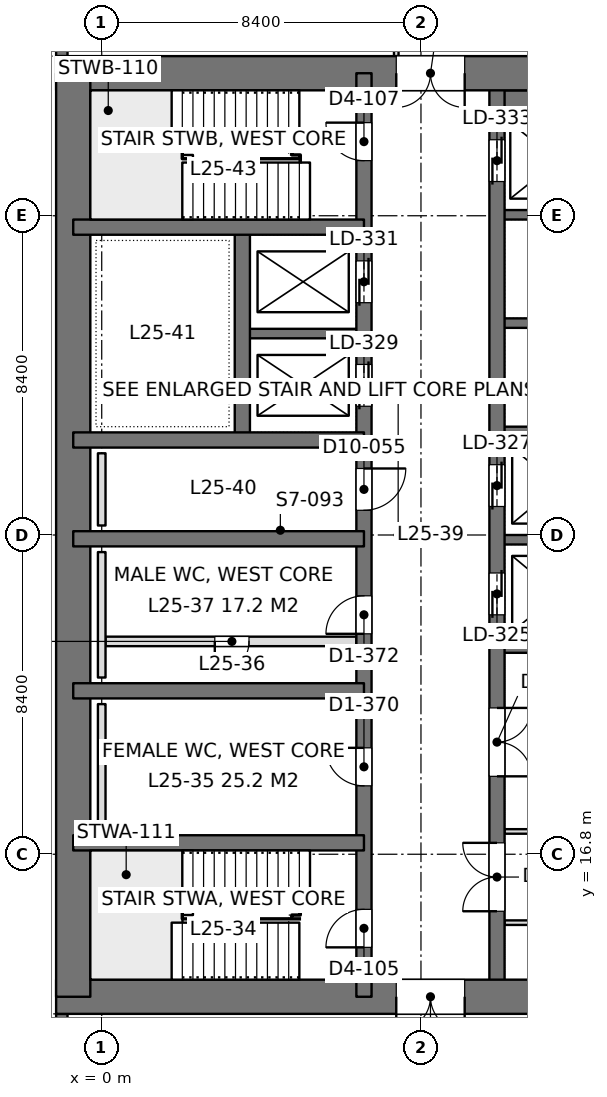
"""IFC4 building model, lengths in metres.
Left out: names, types, materials, properties, quantities, classifications, styles, units other than length and angle.
Written with IfcOpenShell. Run it as: python <this file> out.ifc"""

import sys

from ifc_helpers import new_model, si_unit, direction, frame, frame_2d, origin, place, context, subcontext, project, spatial, rectangle, extrude, element, fill, save


model = new_model("IFC4")
c1 = context("Model", 3, precision=1e-05, world=origin(), true_north=direction((0.0, 1.0)))
c2 = subcontext(c1, "Body", "Model", "MODEL_VIEW")
j1 = project(units=[si_unit("LENGTHUNIT", "METRE"), si_unit("PLANEANGLEUNIT", "RADIAN")], contexts=[c1])
p1 = place(None, origin())
s1 = spatial("IfcSite", under=j1, at=p1, CompositionType="ELEMENT")
p2 = place(p1, origin())
s2 = spatial("IfcBuilding", under=s1, at=p2, CompositionType="ELEMENT")
p3 = place(p2, frame((0.0, 0.0, 113.4)))
s3 = spatial("IfcBuildingStorey", under=s2, at=p3, CompositionType="ELEMENT", Elevation=113.4)
p4 = place(p3, frame((-1.2, 13.05, 0.0), z_axis=(0.0, 0.0, 1.0), x_axis=(1.0, 0.0, 0.0)))
e1 = element("IfcWall", 1, at=p4, inside=s3, PredefinedType="SHEAR", context=c2, shape_type="SweptSolid", body=[
    extrude(rectangle(XDim=18.0, YDim=0.9, at=frame_2d((9.0, 0.0))), origin(), (0.0, 0.0, 1.0), 4.2),
])
p5 = place(p4, frame((8.95, 0.0, 0.0)))
e2 = element("IfcOpeningElement", 2, at=p5, cuts=e1, PredefinedType="OPENING", context=c2, shape_type="SweptSolid", body=[
    extrude(rectangle(XDim=1.8, YDim=2.4, at=frame_2d((0.9, 1.2))), frame((0.0, 0.46, 0.0), z_axis=(0.0, -1.0, 0.0), x_axis=(1.0, 0.0, 0.0)), (0.0, 0.0, 1.0), 0.92),
])
p6 = place(p3, frame((-1.2, 37.35, 0.0), z_axis=(0.0, 0.0, 1.0), x_axis=(1.0, 0.0, 0.0)))
e3 = element("IfcWall", 3, at=p6, inside=s3, PredefinedType="SHEAR", context=c2, shape_type="SweptSolid", body=[
    extrude(rectangle(XDim=18.0, YDim=0.9, at=frame_2d((9.0, 0.0))), origin(), (0.0, 0.0, 1.0), 4.2),
])
p7 = place(p6, frame((8.95, 0.0, 0.0)))
e4 = element("IfcOpeningElement", 4, at=p7, cuts=e3, PredefinedType="OPENING", context=c2, shape_type="SweptSolid", body=[
    extrude(rectangle(XDim=1.8, YDim=2.4, at=frame_2d((0.9, 1.2))), frame((0.0, 0.46, 0.0), z_axis=(0.0, -1.0, 0.0), x_axis=(1.0, 0.0, 0.0)), (0.0, 0.0, 1.0), 0.92),
])
p8 = place(p3, frame((-0.75, 13.05, 0.0), z_axis=(0.0, 0.0, 1.0), x_axis=(0.0, 1.0, 0.0)))
e5 = element("IfcWall", 5, at=p8, inside=s3, PredefinedType="SHEAR", context=c2, shape_type="SweptSolid", body=[
    extrude(rectangle(XDim=24.3, YDim=0.9, at=frame_2d((12.15, 0.0))), origin(), (0.0, 0.0, 1.0), 4.2),
])
p9 = place(p3, frame((6.9, 13.05, 0.0), z_axis=(0.0, 0.0, 1.0), x_axis=(0.0, 1.0, 0.0)))
e6 = element("IfcWall", 6, at=p9, inside=s3, PredefinedType="SHEAR", context=c2, shape_type="SweptSolid", body=[
    extrude(rectangle(XDim=24.3, YDim=0.4, at=frame_2d((12.15, 0.0))), origin(), (0.0, 0.0, 1.0), 4.2),
])
p10 = place(p9, frame((1.3, 0.0, 0.0)))
e7 = element("IfcOpeningElement", 7, at=p10, cuts=e6, PredefinedType="OPENING", context=c2, shape_type="SweptSolid", body=[
    extrude(rectangle(XDim=1.0, YDim=2.2, at=frame_2d((0.5, 1.1))), frame((0.0, 0.21, 0.0), z_axis=(0.0, -1.0, 0.0), x_axis=(1.0, 0.0, 0.0)), (0.0, 0.0, 1.0), 0.42),
])
p11 = place(p9, frame((22.0, 0.0, 0.0)))
e8 = element("IfcOpeningElement", 8, at=p11, cuts=e6, PredefinedType="OPENING", context=c2, shape_type="SweptSolid", body=[
    extrude(rectangle(XDim=1.0, YDim=2.2, at=frame_2d((0.5, 1.1))), frame((0.0, 0.21, 0.0), z_axis=(0.0, -1.0, 0.0), x_axis=(1.0, 0.0, 0.0)), (0.0, 0.0, 1.0), 0.42),
])
p12 = place(p9, frame((5.55, 0.0, 0.0)))
e9 = element("IfcOpeningElement", 9, at=p12, cuts=e6, PredefinedType="OPENING", context=c2, shape_type="SweptSolid", body=[
    extrude(rectangle(XDim=1.0, YDim=2.2, at=frame_2d((0.5, 1.1))), frame((0.0, 0.21, 0.0), z_axis=(0.0, -1.0, 0.0), x_axis=(1.0, 0.0, 0.0)), (0.0, 0.0, 1.0), 0.42),
])
p13 = place(p9, frame((9.55, 0.0, 0.0)))
e10 = element("IfcOpeningElement", 10, at=p13, cuts=e6, PredefinedType="OPENING", context=c2, shape_type="SweptSolid", body=[
    extrude(rectangle(XDim=1.0, YDim=2.2, at=frame_2d((0.5, 1.1))), frame((0.0, 0.21, 0.0), z_axis=(0.0, -1.0, 0.0), x_axis=(1.0, 0.0, 0.0)), (0.0, 0.0, 1.0), 0.42),
])
p14 = place(p9, frame((12.8, 0.0, 0.0)))
e11 = element("IfcOpeningElement", 11, at=p14, cuts=e6, PredefinedType="OPENING", context=c2, shape_type="SweptSolid", body=[
    extrude(rectangle(XDim=1.1, YDim=2.2, at=frame_2d((0.55, 1.1))), frame((0.0, 0.21, 0.0), z_axis=(0.0, -1.0, 0.0), x_axis=(1.0, 0.0, 0.0)), (0.0, 0.0, 1.0), 0.42),
])
p15 = place(p9, frame((15.538, 0.0, 0.0)))
e12 = element("IfcOpeningElement", 12, at=p15, cuts=e6, PredefinedType="OPENING", context=c2, shape_type="SweptSolid", body=[
    extrude(rectangle(XDim=1.1, YDim=2.2, at=frame_2d((0.55, 1.1))), frame((0.0, 0.21, 0.0), z_axis=(0.0, -1.0, 0.0), x_axis=(1.0, 0.0, 0.0)), (0.0, 0.0, 1.0), 0.42),
])
p16 = place(p9, frame((18.262, 0.0, 0.0)))
e13 = element("IfcOpeningElement", 13, at=p16, cuts=e6, PredefinedType="OPENING", context=c2, shape_type="SweptSolid", body=[
    extrude(rectangle(XDim=1.1, YDim=2.2, at=frame_2d((0.55, 1.1))), frame((0.0, 0.21, 0.0), z_axis=(0.0, -1.0, 0.0), x_axis=(1.0, 0.0, 0.0)), (0.0, 0.0, 1.0), 0.42),
])
p17 = place(p3, frame((10.4, 13.05, 0.0), z_axis=(0.0, 0.0, 1.0), x_axis=(0.0, 1.0, 0.0)))
e14 = element("IfcWall", 14, at=p17, inside=s3, PredefinedType="SHEAR", context=c2, shape_type="SweptSolid", body=[
    extrude(rectangle(XDim=24.3, YDim=0.4, at=frame_2d((12.15, 0.0))), origin(), (0.0, 0.0, 1.0), 4.2),
])
p18 = place(p17, frame((10.05, 0.0, 0.0)))
e15 = element("IfcOpeningElement", 15, at=p18, cuts=e14, PredefinedType="OPENING", context=c2, shape_type="SweptSolid", body=[
    extrude(rectangle(XDim=1.1, YDim=2.2, at=frame_2d((0.55, 1.1))), frame((0.0, 0.21, 0.0), z_axis=(0.0, -1.0, 0.0), x_axis=(1.0, 0.0, 0.0)), (0.0, 0.0, 1.0), 0.42),
])
p19 = place(p17, frame((12.9, 0.0, 0.0)))
e16 = element("IfcOpeningElement", 16, at=p19, cuts=e14, PredefinedType="OPENING", context=c2, shape_type="SweptSolid", body=[
    extrude(rectangle(XDim=1.1, YDim=2.2, at=frame_2d((0.55, 1.1))), frame((0.0, 0.21, 0.0), z_axis=(0.0, -1.0, 0.0), x_axis=(1.0, 0.0, 0.0)), (0.0, 0.0, 1.0), 0.42),
])
p20 = place(p17, frame((21.45, 0.0, 0.0)))
e17 = element("IfcOpeningElement", 17, at=p20, cuts=e14, PredefinedType="OPENING", context=c2, shape_type="SweptSolid", body=[
    extrude(rectangle(XDim=1.1, YDim=2.2, at=frame_2d((0.55, 1.1))), frame((0.0, 0.21, 0.0), z_axis=(0.0, -1.0, 0.0), x_axis=(1.0, 0.0, 0.0)), (0.0, 0.0, 1.0), 0.42),
])
p21 = place(p17, frame((2.25, 0.0, 0.0)))
e18 = element("IfcOpeningElement", 18, at=p21, cuts=e14, PredefinedType="OPENING", context=c2, shape_type="SweptSolid", body=[
    extrude(rectangle(XDim=1.8, YDim=2.4, at=frame_2d((0.9, 1.2))), frame((0.0, 0.21, 0.0), z_axis=(0.0, -1.0, 0.0), x_axis=(1.0, 0.0, 0.0)), (0.0, 0.0, 1.0), 0.42),
])
p22 = place(p17, frame((5.8, 0.0, 0.0)))
e19 = element("IfcOpeningElement", 19, at=p22, cuts=e14, PredefinedType="OPENING", context=c2, shape_type="SweptSolid", body=[
    extrude(rectangle(XDim=1.8, YDim=2.4, at=frame_2d((0.9, 1.2))), frame((0.0, 0.21, 0.0), z_axis=(0.0, -1.0, 0.0), x_axis=(1.0, 0.0, 0.0)), (0.0, 0.0, 1.0), 0.42),
])
for number, where, z_axis, x_axis in (
    (20, (-0.75, 17.1, 0.0), (0.0, 0.0, 1.0), (1.0, 0.0, 0.0)),
    (21, (-0.75, 21.1, 0.0), (0.0, 0.0, 1.0), (1.0, 0.0, 0.0)),
    (22, (-0.75, 25.1, 0.0), (0.0, 0.0, 1.0), (1.0, 0.0, 0.0)),
    (23, (-0.75, 27.7, 0.0), (0.0, 0.0, 1.0), (1.0, 0.0, 0.0)),
    (24, (-0.75, 33.3, 0.0), (0.0, 0.0, 1.0), (1.0, 0.0, 0.0)),
):
    element("IfcWall", number, at=place(p3, frame(where, z_axis=z_axis, x_axis=x_axis)), inside=s3, PredefinedType="SHEAR", context=c2, shape_type="SweptSolid", body=[
        extrude(rectangle(XDim=7.65, YDim=0.4, at=frame_2d((3.825, 0.0))), origin(), (0.0, 0.0, 1.0), 4.2),
    ])
p23 = place(p3, frame((3.7, 27.7, 0.0), z_axis=(0.0, 0.0, 1.0), x_axis=(0.0, 1.0, 0.0)))
e25 = element("IfcWall", 25, at=p23, inside=s3, PredefinedType="SHEAR", context=c2, shape_type="SweptSolid", body=[
    extrude(rectangle(XDim=5.6, YDim=0.4, at=frame_2d((2.8, 0.0))), origin(), (0.0, 0.0, 1.0), 4.2),
])
p24 = place(p3, frame((3.7, 30.5, 0.0), z_axis=(0.0, 0.0, 1.0), x_axis=(1.0, 0.0, 0.0)))
e26 = element("IfcWall", 26, at=p24, inside=s3, PredefinedType="SHEAR", context=c2, shape_type="SweptSolid", body=[
    extrude(rectangle(XDim=3.2, YDim=0.25, at=frame_2d((1.6, 0.0))), origin(), (0.0, 0.0, 1.0), 4.2),
])
p25 = place(p3, frame((10.4, 22.225, 0.0), z_axis=(0.0, 0.0, 1.0), x_axis=(1.0, 0.0, 0.0)))
e27 = element("IfcWall", 27, at=p25, inside=s3, PredefinedType="SHEAR", context=c2, shape_type="SweptSolid", body=[
    extrude(rectangle(XDim=5.95, YDim=0.25, at=frame_2d((2.975, 0.0))), origin(), (0.0, 0.0, 1.0), 4.2),
])
for number, where, z_axis, x_axis in (
    (28, (10.4, 25.075, 0.0), (0.0, 0.0, 1.0), (1.0, 0.0, 0.0)),
    (29, (10.4, 27.925, 0.0), (0.0, 0.0, 1.0), (1.0, 0.0, 0.0)),
    (30, (10.4, 30.775, 0.0), (0.0, 0.0, 1.0), (1.0, 0.0, 0.0)),
    (31, (10.4, 33.625, 0.0), (0.0, 0.0, 1.0), (1.0, 0.0, 0.0)),
):
    element("IfcWall", number, at=place(p3, frame(where, z_axis=z_axis, x_axis=x_axis)), inside=s3, PredefinedType="SHEAR", context=c2, shape_type="SweptSolid", body=[
        extrude(rectangle(XDim=3.2, YDim=0.25, at=frame_2d((1.6, 0.0))), origin(), (0.0, 0.0, 1.0), 4.2),
    ])
p26 = place(p3, frame((10.4, 36.625, 0.0), z_axis=(0.0, 0.0, 1.0), x_axis=(1.0, 0.0, 0.0)))
e32 = element("IfcWall", 32, at=p26, inside=s3, PredefinedType="SHEAR", context=c2, shape_type="SweptSolid", body=[
    extrude(rectangle(XDim=3.2, YDim=0.55, at=frame_2d((1.6, 0.0))), origin(), (0.0, 0.0, 1.0), 4.2),
])
p27 = place(p3, frame((-1.05, 8.4, 0.0), z_axis=(0.0, 0.0, 1.0), x_axis=(0.0, 1.0, 0.0)))
e33 = element("IfcWall", 33, at=p27, inside=s3, PredefinedType="SOLIDWALL", context=c2, shape_type="SweptSolid", body=[
    extrude(rectangle(XDim=4.2, YDim=0.3, at=frame_2d((2.1, 0.0))), origin(), (0.0, 0.0, 1.0), 4.05),
])
p28 = place(p27, frame((0.9, 0.0, 0.9)))
e34 = element("IfcOpeningElement", 34, at=p28, cuts=e33, PredefinedType="OPENING", context=c2, shape_type="SweptSolid", body=[
    extrude(rectangle(XDim=2.4, YDim=1.9, at=frame_2d((1.2, 0.95))), frame((0.0, 0.16, 0.0), z_axis=(0.0, -1.0, 0.0), x_axis=(1.0, 0.0, 0.0)), (0.0, 0.0, 1.0), 0.32),
])
p29 = place(p3, frame((-1.05, 37.8, 0.0), z_axis=(0.0, 0.0, 1.0), x_axis=(0.0, 1.0, 0.0)))
e35 = element("IfcWall", 35, at=p29, inside=s3, PredefinedType="SOLIDWALL", context=c2, shape_type="SweptSolid", body=[
    extrude(rectangle(XDim=4.2, YDim=0.3, at=frame_2d((2.1, 0.0))), origin(), (0.0, 0.0, 1.0), 4.05),
])
p30 = place(p29, frame((0.9, 0.0, 0.9)))
e36 = element("IfcOpeningElement", 36, at=p30, cuts=e35, PredefinedType="OPENING", context=c2, shape_type="SweptSolid", body=[
    extrude(rectangle(XDim=2.4, YDim=1.9, at=frame_2d((1.2, 0.95))), frame((0.0, 0.16, 0.0), z_axis=(0.0, -1.0, 0.0), x_axis=(1.0, 0.0, 0.0)), (0.0, 0.0, 1.0), 0.32),
])
p31 = place(p3, frame((10.598, 17.4, 0.0), z_axis=(0.0, 0.0, 1.0), x_axis=(1.0, 0.0, 0.0)))
e37 = element("IfcWall", 37, at=p31, inside=s3, PredefinedType="PARTITIONING", context=c2, shape_type="SweptSolid", body=[
    extrude(rectangle(XDim=5.904, YDim=0.12, at=frame_2d((2.952, 0.0))), origin(), (0.0, 0.0, 1.0), 3.55),
])
p32 = place(p3, frame((10.598, 15.0, 0.0), z_axis=(0.0, 0.0, 1.0), x_axis=(1.0, 0.0, 0.0)))
e38 = element("IfcWall", 38, at=p32, inside=s3, PredefinedType="PARTITIONING", context=c2, shape_type="SweptSolid", body=[
    extrude(rectangle(XDim=6.204, YDim=0.12, at=frame_2d((3.102, 0.0))), origin(), (0.0, 0.0, 1.0), 3.55),
])
p33 = place(p3, frame((7.75, 37.8, 0.0), z_axis=(0.0, 0.0, 1.0), x_axis=(0.0, 1.0, 0.0)))
e39 = element("IfcWall", 39, at=p33, inside=s3, PredefinedType="PARTITIONING", context=c2, shape_type="SweptSolid", body=[
    extrude(rectangle(XDim=2.0, YDim=0.12, at=frame_2d((1.0, 0.0))), origin(), (0.0, 0.0, 1.0), 4.05),
])
p34 = place(p3, frame((0.1, 22.4, 0.0), z_axis=(0.0, 0.0, 1.0), x_axis=(1.0, 0.0, 0.0)))
e40 = element("IfcWall", 40, at=p34, inside=s3, PredefinedType="PARTITIONING", context=c2, shape_type="SweptSolid", body=[
    extrude(rectangle(XDim=6.6, YDim=0.25, at=frame_2d((3.3, 0.0))), origin(), (0.0, 0.0, 1.0), 4.0),
])
p35 = place(p34, frame((2.875, 0.0, 0.0)))
e41 = element("IfcOpeningElement", 41, at=p35, cuts=e40, PredefinedType="OPENING", context=c2, shape_type="SweptSolid", body=[
    extrude(rectangle(XDim=0.9, YDim=2.2, at=frame_2d((0.45, 1.1))), frame((0.0, 0.135, 0.0), z_axis=(0.0, -1.0, 0.0), x_axis=(1.0, 0.0, 0.0)), (0.0, 0.0, 1.0), 0.27),
])
for number, where, z_axis, x_axis in (
    (42, (0.0, 17.45, 0.0), (0.0, 0.0, 1.0), (0.0, 1.0, 0.0)),
    (43, (0.0, 21.45, 0.0), (0.0, 0.0, 1.0), (0.0, 1.0, 0.0)),
):
    element("IfcWall", number, at=place(p3, frame(where, z_axis=z_axis, x_axis=x_axis)), inside=s3, PredefinedType="PLUMBINGWALL", context=c2, shape_type="SweptSolid", body=[
        extrude(rectangle(XDim=3.3, YDim=0.2, at=frame_2d((1.65, 0.0))), origin(), (0.0, 0.0, 1.0), 1.2),
    ])
p36 = place(p3, frame((0.0, 25.45, 0.0), z_axis=(0.0, 0.0, 1.0), x_axis=(0.0, 1.0, 0.0)))
e44 = element("IfcWall", 44, at=p36, inside=s3, PredefinedType="PLUMBINGWALL", context=c2, shape_type="SweptSolid", body=[
    extrude(rectangle(XDim=1.9, YDim=0.2, at=frame_2d((0.95, 0.0))), origin(), (0.0, 0.0, 1.0), 1.2),
])
p37 = place(p5, frame((1.8, 0.0, 0.0), z_axis=(0.0, 0.0, 1.0), x_axis=(-1.0, 0.0, 0.0)))
e45 = element("IfcDoor", 45, at=p37, inside=s3, OperationType="DOUBLE_DOOR_SINGLE_SWING", PredefinedType="DOOR", context=c2, shape_type="SweptSolid", body=[
    extrude(rectangle(XDim=1.8, YDim=2.4, at=frame_2d((0.9, 1.2))), frame((0.0, 0.025, 0.0), z_axis=(0.0, -1.0, 0.0), x_axis=(1.0, 0.0, 0.0)), (0.0, 0.0, 1.0), 0.05),
])
fill(e2, e45)
p38 = place(p7, frame((1.8, 0.0, 0.0), z_axis=(0.0, 0.0, 1.0), x_axis=(-1.0, 0.0, 0.0)))
e46 = element("IfcDoor", 46, at=p38, inside=s3, OperationType="DOUBLE_DOOR_SINGLE_SWING", PredefinedType="DOOR", context=c2, shape_type="SweptSolid", body=[
    extrude(rectangle(XDim=1.8, YDim=2.4, at=frame_2d((0.9, 1.2))), frame((0.0, 0.025, 0.0), z_axis=(0.0, -1.0, 0.0), x_axis=(1.0, 0.0, 0.0)), (0.0, 0.0, 1.0), 0.05),
])
fill(e4, e46)
p39 = place(p10, origin())
e47 = element("IfcDoor", 47, at=p39, inside=s3, OperationType="SINGLE_SWING_LEFT", PredefinedType="DOOR", context=c2, shape_type="SweptSolid", body=[
    extrude(rectangle(XDim=1.0, YDim=2.2, at=frame_2d((0.5, 1.1))), frame((0.0, 0.025, 0.0), z_axis=(0.0, -1.0, 0.0), x_axis=(1.0, 0.0, 0.0)), (0.0, 0.0, 1.0), 0.05),
])
fill(e7, e47)
p40 = place(p11, origin())
e48 = element("IfcDoor", 48, at=p40, inside=s3, OperationType="SINGLE_SWING_RIGHT", PredefinedType="DOOR", context=c2, shape_type="SweptSolid", body=[
    extrude(rectangle(XDim=1.0, YDim=2.2, at=frame_2d((0.5, 1.1))), frame((0.0, 0.025, 0.0), z_axis=(0.0, -1.0, 0.0), x_axis=(1.0, 0.0, 0.0)), (0.0, 0.0, 1.0), 0.05),
])
fill(e8, e48)
p41 = place(p12, origin())
e49 = element("IfcDoor", 49, at=p41, inside=s3, OperationType="SINGLE_SWING_RIGHT", PredefinedType="DOOR", context=c2, shape_type="SweptSolid", body=[
    extrude(rectangle(XDim=1.0, YDim=2.2, at=frame_2d((0.5, 1.1))), frame((0.0, 0.025, 0.0), z_axis=(0.0, -1.0, 0.0), x_axis=(1.0, 0.0, 0.0)), (0.0, 0.0, 1.0), 0.05),
])
fill(e9, e49)
p42 = place(p13, origin())
e50 = element("IfcDoor", 50, at=p42, inside=s3, OperationType="SINGLE_SWING_LEFT", PredefinedType="DOOR", context=c2, shape_type="SweptSolid", body=[
    extrude(rectangle(XDim=1.0, YDim=2.2, at=frame_2d((0.5, 1.1))), frame((0.0, 0.025, 0.0), z_axis=(0.0, -1.0, 0.0), x_axis=(1.0, 0.0, 0.0)), (0.0, 0.0, 1.0), 0.05),
])
fill(e10, e50)
p43 = place(p14, frame((1.1, 0.0, 0.0), z_axis=(0.0, 0.0, 1.0), x_axis=(-1.0, 0.0, 0.0)))
e51 = element("IfcDoor", 51, at=p43, inside=s3, OperationType="SINGLE_SWING_LEFT", PredefinedType="DOOR", context=c2, shape_type="SweptSolid", body=[
    extrude(rectangle(XDim=1.1, YDim=2.2, at=frame_2d((0.55, 1.1))), frame((0.0, 0.025, 0.0), z_axis=(0.0, -1.0, 0.0), x_axis=(1.0, 0.0, 0.0)), (0.0, 0.0, 1.0), 0.05),
])
fill(e11, e51)
p44 = place(p18, origin())
e52 = element("IfcDoor", 52, at=p44, inside=s3, OperationType="DOUBLE_DOOR_SLIDING", PredefinedType="DOOR", context=c2, shape_type="SweptSolid", body=[
    extrude(rectangle(XDim=1.1, YDim=2.2, at=frame_2d((0.55, 1.1))), frame((0.0, 0.025, 0.0), z_axis=(0.0, -1.0, 0.0), x_axis=(1.0, 0.0, 0.0)), (0.0, 0.0, 1.0), 0.05),
])
fill(e15, e52)
p45 = place(p19, origin())
e53 = element("IfcDoor", 53, at=p45, inside=s3, OperationType="DOUBLE_DOOR_SLIDING", PredefinedType="DOOR", context=c2, shape_type="SweptSolid", body=[
    extrude(rectangle(XDim=1.1, YDim=2.2, at=frame_2d((0.55, 1.1))), frame((0.0, 0.025, 0.0), z_axis=(0.0, -1.0, 0.0), x_axis=(1.0, 0.0, 0.0)), (0.0, 0.0, 1.0), 0.05),
])
fill(e16, e53)
p46 = place(p20, origin())
e54 = element("IfcDoor", 54, at=p46, inside=s3, OperationType="DOUBLE_DOOR_SLIDING", PredefinedType="DOOR", context=c2, shape_type="SweptSolid", body=[
    extrude(rectangle(XDim=1.1, YDim=2.2, at=frame_2d((0.55, 1.1))), frame((0.0, 0.025, 0.0), z_axis=(0.0, -1.0, 0.0), x_axis=(1.0, 0.0, 0.0)), (0.0, 0.0, 1.0), 0.05),
])
fill(e17, e54)
p47 = place(p15, origin())
e55 = element("IfcDoor", 55, at=p47, inside=s3, OperationType="DOUBLE_DOOR_SLIDING", PredefinedType="DOOR", context=c2, shape_type="SweptSolid", body=[
    extrude(rectangle(XDim=1.1, YDim=2.2, at=frame_2d((0.55, 1.1))), frame((0.0, 0.025, 0.0), z_axis=(0.0, -1.0, 0.0), x_axis=(1.0, 0.0, 0.0)), (0.0, 0.0, 1.0), 0.05),
])
fill(e12, e55)
p48 = place(p16, origin())
e56 = element("IfcDoor", 56, at=p48, inside=s3, OperationType="DOUBLE_DOOR_SLIDING", PredefinedType="DOOR", context=c2, shape_type="SweptSolid", body=[
    extrude(rectangle(XDim=1.1, YDim=2.2, at=frame_2d((0.55, 1.1))), frame((0.0, 0.025, 0.0), z_axis=(0.0, -1.0, 0.0), x_axis=(1.0, 0.0, 0.0)), (0.0, 0.0, 1.0), 0.05),
])
fill(e13, e56)
p49 = place(p21, origin())
e57 = element("IfcDoor", 57, at=p49, inside=s3, OperationType="DOUBLE_DOOR_SINGLE_SWING", PredefinedType="DOOR", context=c2, shape_type="SweptSolid", body=[
    extrude(rectangle(XDim=1.8, YDim=2.4, at=frame_2d((0.9, 1.2))), frame((0.0, 0.025, 0.0), z_axis=(0.0, -1.0, 0.0), x_axis=(1.0, 0.0, 0.0)), (0.0, 0.0, 1.0), 0.05),
])
fill(e18, e57)
p50 = place(p22, frame((1.8, 0.0, 0.0), z_axis=(0.0, 0.0, 1.0), x_axis=(-1.0, 0.0, 0.0)))
e58 = element("IfcDoor", 58, at=p50, inside=s3, OperationType="DOUBLE_DOOR_SINGLE_SWING", PredefinedType="DOOR", context=c2, shape_type="SweptSolid", body=[
    extrude(rectangle(XDim=1.8, YDim=2.4, at=frame_2d((0.9, 1.2))), frame((0.0, 0.025, 0.0), z_axis=(0.0, -1.0, 0.0), x_axis=(1.0, 0.0, 0.0)), (0.0, 0.0, 1.0), 0.05),
])
fill(e19, e58)
p51 = place(p35, frame((0.9, 0.0, 0.0), z_axis=(0.0, 0.0, 1.0), x_axis=(-1.0, 0.0, 0.0)))
e59 = element("IfcDoor", 59, at=p51, inside=s3, OperationType="SINGLE_SWING_RIGHT", PredefinedType="DOOR", context=c2, shape_type="SweptSolid", body=[
    extrude(rectangle(XDim=0.9, YDim=2.2, at=frame_2d((0.45, 1.1))), frame((0.0, 0.025, 0.0), z_axis=(0.0, -1.0, 0.0), x_axis=(1.0, 0.0, 0.0)), (0.0, 0.0, 1.0), 0.05),
])
fill(e41, e59)
save(model, sys.argv[1])
